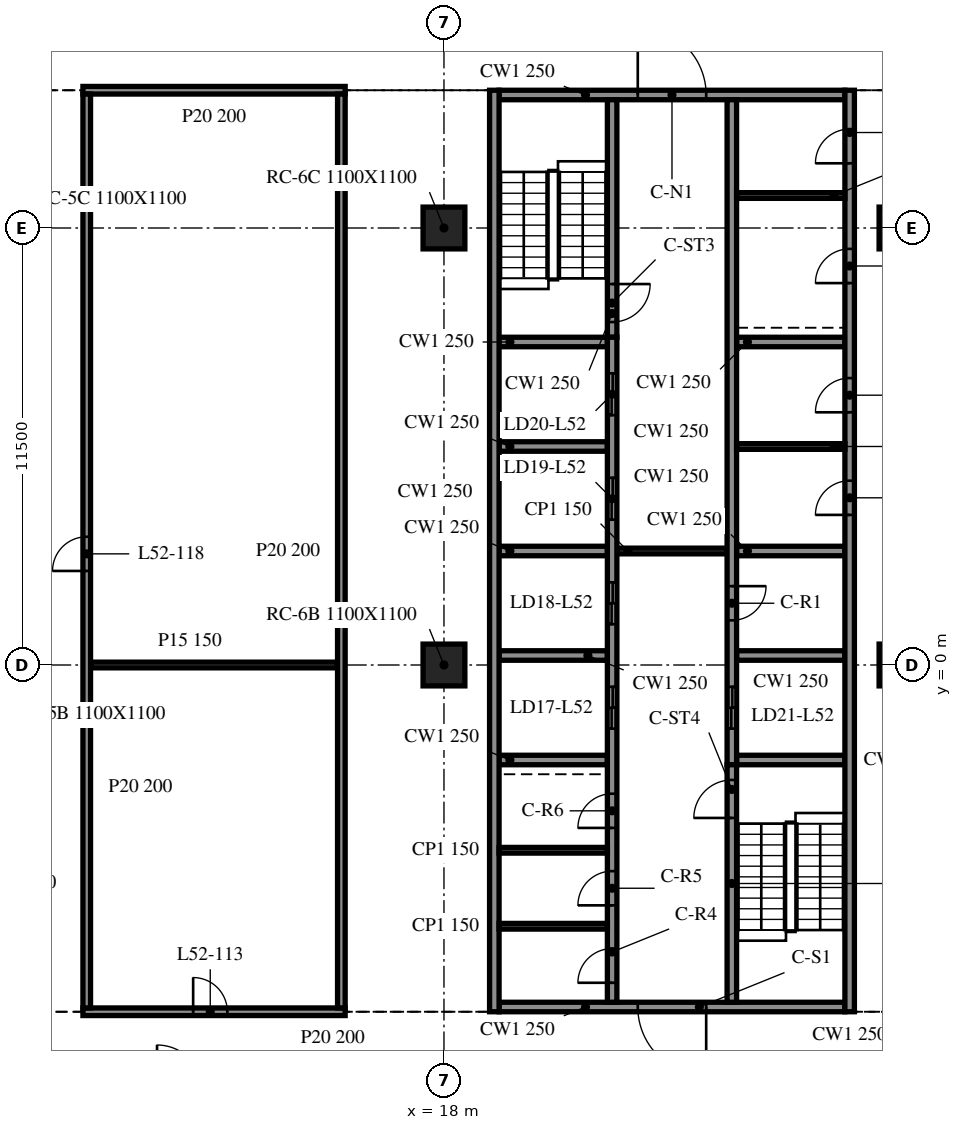
"""IFC4 building model, lengths in metres.
Left out: names, types, materials, properties, quantities, classifications, styles, units other than length and angle.
Written with IfcOpenShell. Run it as: python <this file> out.ifc"""

import sys

from ifc_helpers import new_model, si_unit, direction, frame, frame_2d, origin, origin_2d, place, context, subcontext, project, spatial, rectangle, extrude, element, fill, save


model = new_model("IFC4")
c1 = context("Model", 3, precision=1e-05, world=origin(), true_north=direction((0.0, 1.0)))
c2 = subcontext(c1, "Body", "Model", "MODEL_VIEW")
j1 = project(units=[si_unit("LENGTHUNIT", "METRE"), si_unit("PLANEANGLEUNIT", "RADIAN")], contexts=[c1])
p1 = place(None, origin())
s1 = spatial("IfcSite", under=j1, at=p1, CompositionType="ELEMENT")
p2 = place(p1, origin())
s2 = spatial("IfcBuilding", under=s1, at=p2, CompositionType="ELEMENT")
p3 = place(p2, frame((0.0, 0.0, 216.7)))
s3 = spatial("IfcBuildingStorey", under=s2, at=p3, CompositionType="ELEMENT", Elevation=216.7)
for number, where, z_axis, x_axis in (
    (1, (18.0, 0.0, -0.34), (0.0, 0.0, 1.0), (1.0, 0.0, 0.0)),
    (2, (18.0, 11.5, -0.34), (0.0, 0.0, 1.0), (1.0, 0.0, 0.0)),
    (3, (30.0, 0.0, -0.34), (0.0, 0.0, 1.0), (1.0, 0.0, 0.0)),
    (4, (30.0, 11.5, -0.34), (0.0, 0.0, 1.0), (1.0, 0.0, 0.0)),
):
    element("IfcColumn", number, at=place(p3, frame(where, z_axis=z_axis, x_axis=x_axis)), inside=s3, PredefinedType="COLUMN", context=c2, shape_type="SweptSolid", body=[
        extrude(rectangle(XDim=1.1, YDim=1.1, at=origin_2d()), origin(), (0.0, 0.0, 1.0), 3.8),
    ])
p4 = place(p3, frame((19.325, 15.125, 0.0), z_axis=(0.0, 0.0, 1.0), x_axis=(0.0, -1.0, 0.0)))
e5 = element("IfcWall", 5, at=p4, inside=s3, PredefinedType="SOLIDWALL", context=c2, shape_type="SweptSolid", body=[
    extrude(rectangle(XDim=24.25, YDim=0.25, at=frame_2d((12.125, 0.0))), origin(), (0.0, 0.0, 1.0), 3.46),
])
p5 = place(p3, frame((28.675, -9.125, 0.0), z_axis=(0.0, 0.0, 1.0), x_axis=(0.0, 1.0, 0.0)))
e6 = element("IfcWall", 6, at=p5, inside=s3, PredefinedType="SOLIDWALL", context=c2, shape_type="SweptSolid", body=[
    extrude(rectangle(XDim=24.25, YDim=0.25, at=frame_2d((12.125, 0.0))), origin(), (0.0, 0.0, 1.0), 3.46),
])
p6 = place(p5, frame((13.075, 0.0, 0.0)))
e7 = element("IfcOpeningElement", 7, at=p6, cuts=e6, PredefinedType="OPENING", context=c2, shape_type="SweptSolid", body=[
    extrude(rectangle(XDim=0.9, YDim=2.1, at=frame_2d((0.45, 1.05))), frame((0.0, 0.135, 0.0), z_axis=(0.0, -1.0, 0.0), x_axis=(1.0, 0.0, 0.0)), (0.0, 0.0, 1.0), 0.27),
])
p7 = place(p5, frame((15.775, 0.0, 0.0)))
e8 = element("IfcOpeningElement", 8, at=p7, cuts=e6, PredefinedType="OPENING", context=c2, shape_type="SweptSolid", body=[
    extrude(rectangle(XDim=0.9, YDim=2.1, at=frame_2d((0.45, 1.05))), frame((0.0, 0.135, 0.0), z_axis=(0.0, -1.0, 0.0), x_axis=(1.0, 0.0, 0.0)), (0.0, 0.0, 1.0), 0.27),
])
p8 = place(p5, frame((19.175, 0.0, 0.0)))
e9 = element("IfcOpeningElement", 9, at=p8, cuts=e6, PredefinedType="OPENING", context=c2, shape_type="SweptSolid", body=[
    extrude(rectangle(XDim=0.9, YDim=2.1, at=frame_2d((0.45, 1.05))), frame((0.0, 0.135, 0.0), z_axis=(0.0, -1.0, 0.0), x_axis=(1.0, 0.0, 0.0)), (0.0, 0.0, 1.0), 0.27),
])
p9 = place(p5, frame((22.327, 0.0, 0.0)))
e10 = element("IfcOpeningElement", 10, at=p9, cuts=e6, PredefinedType="OPENING", context=c2, shape_type="SweptSolid", body=[
    extrude(rectangle(XDim=0.9, YDim=2.1, at=frame_2d((0.45, 1.05))), frame((0.0, 0.135, 0.0), z_axis=(0.0, -1.0, 0.0), x_axis=(1.0, 0.0, 0.0)), (0.0, 0.0, 1.0), 0.27),
])
p10 = place(p3, frame((28.55, -9.0, 0.0), z_axis=(0.0, 0.0, 1.0), x_axis=(-1.0, 0.0, 0.0)))
e11 = element("IfcWall", 11, at=p10, inside=s3, PredefinedType="SOLIDWALL", context=c2, shape_type="SweptSolid", body=[
    extrude(rectangle(XDim=9.1, YDim=0.25, at=frame_2d((4.55, 0.0))), origin(), (0.0, 0.0, 1.0), 3.46),
])
p11 = place(p10, frame((3.65, 0.0, 0.0)))
e12 = element("IfcOpeningElement", 12, at=p11, cuts=e11, PredefinedType="OPENING", context=c2, shape_type="SweptSolid", body=[
    extrude(rectangle(XDim=1.8, YDim=2.1, at=frame_2d((0.9, 1.05))), frame((0.0, 0.135, 0.0), z_axis=(0.0, -1.0, 0.0), x_axis=(1.0, 0.0, 0.0)), (0.0, 0.0, 1.0), 0.27),
])
p12 = place(p3, frame((19.45, 15.0, 0.0), z_axis=(0.0, 0.0, 1.0), x_axis=(1.0, 0.0, 0.0)))
e13 = element("IfcWall", 13, at=p12, inside=s3, PredefinedType="SOLIDWALL", context=c2, shape_type="SweptSolid", body=[
    extrude(rectangle(XDim=9.1, YDim=0.25, at=frame_2d((4.55, 0.0))), origin(), (0.0, 0.0, 1.0), 3.46),
])
p13 = place(p12, frame((3.65, 0.0, 0.0)))
e14 = element("IfcOpeningElement", 14, at=p13, cuts=e13, PredefinedType="OPENING", context=c2, shape_type="SweptSolid", body=[
    extrude(rectangle(XDim=1.8, YDim=2.1, at=frame_2d((0.9, 1.05))), frame((0.0, 0.135, 0.0), z_axis=(0.0, -1.0, 0.0), x_axis=(1.0, 0.0, 0.0)), (0.0, 0.0, 1.0), 0.27),
])
p14 = place(p3, frame((22.425, -8.875, 0.0), z_axis=(0.0, 0.0, 1.0), x_axis=(0.0, 1.0, 0.0)))
e15 = element("IfcWall", 15, at=p14, inside=s3, PredefinedType="SOLIDWALL", context=c2, shape_type="SweptSolid", body=[
    extrude(rectangle(XDim=17.5, YDim=0.25, at=frame_2d((8.75, 0.0))), origin(), (0.0, 0.0, 1.0), 3.46),
])
p15 = place(p14, frame((7.2, 0.0, 0.0)))
e16 = element("IfcOpeningElement", 16, at=p15, cuts=e15, PredefinedType="OPENING", context=c2, shape_type="SweptSolid", body=[
    extrude(rectangle(XDim=1.1, YDim=2.1, at=frame_2d((0.55, 1.05))), frame((0.0, 0.135, 0.0), z_axis=(0.0, -1.0, 0.0), x_axis=(1.0, 0.0, 0.0)), (0.0, 0.0, 1.0), 0.27),
])
p16 = place(p14, frame((9.95, 0.0, 0.0)))
e17 = element("IfcOpeningElement", 17, at=p16, cuts=e15, PredefinedType="OPENING", context=c2, shape_type="SweptSolid", body=[
    extrude(rectangle(XDim=1.1, YDim=2.1, at=frame_2d((0.55, 1.05))), frame((0.0, 0.135, 0.0), z_axis=(0.0, -1.0, 0.0), x_axis=(1.0, 0.0, 0.0)), (0.0, 0.0, 1.0), 0.27),
])
p17 = place(p14, frame((12.7, 0.0, 0.0)))
e18 = element("IfcOpeningElement", 18, at=p17, cuts=e15, PredefinedType="OPENING", context=c2, shape_type="SweptSolid", body=[
    extrude(rectangle(XDim=1.1, YDim=2.1, at=frame_2d((0.55, 1.05))), frame((0.0, 0.135, 0.0), z_axis=(0.0, -1.0, 0.0), x_axis=(1.0, 0.0, 0.0)), (0.0, 0.0, 1.0), 0.27),
])
p18 = place(p14, frame((15.45, 0.0, 0.0)))
e19 = element("IfcOpeningElement", 19, at=p18, cuts=e15, PredefinedType="OPENING", context=c2, shape_type="SweptSolid", body=[
    extrude(rectangle(XDim=1.1, YDim=2.1, at=frame_2d((0.55, 1.05))), frame((0.0, 0.135, 0.0), z_axis=(0.0, -1.0, 0.0), x_axis=(1.0, 0.0, 0.0)), (0.0, 0.0, 1.0), 0.27),
])
p19 = place(p14, frame((0.512, 0.0, 0.0)))
e20 = element("IfcOpeningElement", 20, at=p19, cuts=e15, PredefinedType="OPENING", context=c2, shape_type="SweptSolid", body=[
    extrude(rectangle(XDim=0.9, YDim=2.1, at=frame_2d((0.45, 1.05))), frame((0.0, 0.135, 0.0), z_axis=(0.0, -1.0, 0.0), x_axis=(1.0, 0.0, 0.0)), (0.0, 0.0, 1.0), 0.27),
])
p20 = place(p14, frame((2.55, 0.0, 0.0)))
e21 = element("IfcOpeningElement", 21, at=p20, cuts=e15, PredefinedType="OPENING", context=c2, shape_type="SweptSolid", body=[
    extrude(rectangle(XDim=0.9, YDim=2.1, at=frame_2d((0.45, 1.05))), frame((0.0, 0.135, 0.0), z_axis=(0.0, -1.0, 0.0), x_axis=(1.0, 0.0, 0.0)), (0.0, 0.0, 1.0), 0.27),
])
p21 = place(p14, frame((4.587, 0.0, 0.0)))
e22 = element("IfcOpeningElement", 22, at=p21, cuts=e15, PredefinedType="OPENING", context=c2, shape_type="SweptSolid", body=[
    extrude(rectangle(XDim=0.9, YDim=2.1, at=frame_2d((0.45, 1.05))), frame((0.0, 0.135, 0.0), z_axis=(0.0, -1.0, 0.0), x_axis=(1.0, 0.0, 0.0)), (0.0, 0.0, 1.0), 0.27),
])
p22 = place(p3, frame((22.425, 14.875, 0.0), z_axis=(0.0, 0.0, 1.0), x_axis=(0.0, -1.0, 0.0)))
e23 = element("IfcWall", 23, at=p22, inside=s3, PredefinedType="SOLIDWALL", context=c2, shape_type="SweptSolid", body=[
    extrude(rectangle(XDim=6.25, YDim=0.25, at=frame_2d((3.125, 0.0))), origin(), (0.0, 0.0, 1.0), 3.46),
])
p23 = place(p22, frame((4.85, 0.0, 0.0)))
e24 = element("IfcOpeningElement", 24, at=p23, cuts=e23, PredefinedType="OPENING", context=c2, shape_type="SweptSolid", body=[
    extrude(rectangle(XDim=1.0, YDim=2.1, at=frame_2d((0.5, 1.05))), frame((0.0, 0.135, 0.0), z_axis=(0.0, -1.0, 0.0), x_axis=(1.0, 0.0, 0.0)), (0.0, 0.0, 1.0), 0.27),
])
p24 = place(p3, frame((25.575, -8.875, 0.0), z_axis=(0.0, 0.0, 1.0), x_axis=(0.0, 1.0, 0.0)))
e25 = element("IfcWall", 25, at=p24, inside=s3, PredefinedType="SOLIDWALL", context=c2, shape_type="SweptSolid", body=[
    extrude(rectangle(XDim=6.25, YDim=0.25, at=frame_2d((3.125, 0.0))), origin(), (0.0, 0.0, 1.0), 3.46),
])
p25 = place(p24, frame((4.85, 0.0, 0.0)))
e26 = element("IfcOpeningElement", 26, at=p25, cuts=e25, PredefinedType="OPENING", context=c2, shape_type="SweptSolid", body=[
    extrude(rectangle(XDim=1.0, YDim=2.1, at=frame_2d((0.5, 1.05))), frame((0.0, 0.135, 0.0), z_axis=(0.0, -1.0, 0.0), x_axis=(1.0, 0.0, 0.0)), (0.0, 0.0, 1.0), 0.27),
])
p26 = place(p3, frame((25.575, 14.875, 0.0), z_axis=(0.0, 0.0, 1.0), x_axis=(0.0, -1.0, 0.0)))
e27 = element("IfcWall", 27, at=p26, inside=s3, PredefinedType="SOLIDWALL", context=c2, shape_type="SweptSolid", body=[
    extrude(rectangle(XDim=17.5, YDim=0.25, at=frame_2d((8.75, 0.0))), origin(), (0.0, 0.0, 1.0), 3.46),
])
p27 = place(p26, frame((15.45, 0.0, 0.0)))
e28 = element("IfcOpeningElement", 28, at=p27, cuts=e27, PredefinedType="OPENING", context=c2, shape_type="SweptSolid", body=[
    extrude(rectangle(XDim=1.1, YDim=2.1, at=frame_2d((0.55, 1.05))), frame((0.0, 0.135, 0.0), z_axis=(0.0, -1.0, 0.0), x_axis=(1.0, 0.0, 0.0)), (0.0, 0.0, 1.0), 0.27),
])
p28 = place(p26, frame((12.8, 0.0, 0.0)))
e29 = element("IfcOpeningElement", 29, at=p28, cuts=e27, PredefinedType="OPENING", context=c2, shape_type="SweptSolid", body=[
    extrude(rectangle(XDim=0.9, YDim=2.1, at=frame_2d((0.45, 1.05))), frame((0.0, 0.135, 0.0), z_axis=(0.0, -1.0, 0.0), x_axis=(1.0, 0.0, 0.0)), (0.0, 0.0, 1.0), 0.27),
])
for number, where, z_axis, x_axis in (
    (30, (19.45, -2.5, 0.0), (0.0, 0.0, 1.0), (1.0, 0.0, 0.0)),
    (31, (19.45, 0.25, 0.0), (0.0, 0.0, 1.0), (1.0, 0.0, 0.0)),
    (32, (19.45, 3.0, 0.0), (0.0, 0.0, 1.0), (1.0, 0.0, 0.0)),
    (33, (19.45, 5.75, 0.0), (0.0, 0.0, 1.0), (1.0, 0.0, 0.0)),
    (34, (19.45, 8.5, 0.0), (0.0, 0.0, 1.0), (1.0, 0.0, 0.0)),
    (35, (25.7, -2.5, 0.0), (0.0, 0.0, 1.0), (1.0, 0.0, 0.0)),
    (36, (25.7, 0.25, 0.0), (0.0, 0.0, 1.0), (1.0, 0.0, 0.0)),
    (37, (25.7, 3.0, 0.0), (0.0, 0.0, 1.0), (1.0, 0.0, 0.0)),
    (38, (25.7, 8.5, 0.0), (0.0, 0.0, 1.0), (1.0, 0.0, 0.0)),
):
    element("IfcWall", number, at=place(p3, frame(where, z_axis=z_axis, x_axis=x_axis)), inside=s3, PredefinedType="SOLIDWALL", context=c2, shape_type="SweptSolid", body=[
        extrude(rectangle(XDim=2.85, YDim=0.25, at=frame_2d((1.425, 0.0))), origin(), (0.0, 0.0, 1.0), 3.46),
    ])
p29 = place(p3, frame((22.55, 3.0, 0.0), z_axis=(0.0, 0.0, 1.0), x_axis=(1.0, 0.0, 0.0)))
e39 = element("IfcWall", 39, at=p29, inside=s3, PredefinedType="PARTITIONING", context=c2, shape_type="SweptSolid", body=[
    extrude(rectangle(XDim=2.9, YDim=0.15, at=frame_2d((1.45, 0.0))), origin(), (0.0, 0.0, 1.0), 3.46),
])
for number, where, z_axis, x_axis in (
    (40, (25.7, 5.75, 0.0), (0.0, 0.0, 1.0), (1.0, 0.0, 0.0)),
    (41, (19.45, -6.875, 0.0), (0.0, 0.0, 1.0), (1.0, 0.0, 0.0)),
    (42, (19.45, -4.875, 0.0), (0.0, 0.0, 1.0), (1.0, 0.0, 0.0)),
    (43, (25.7, 12.355, 0.0), (0.0, 0.0, 1.0), (1.0, 0.0, 0.0)),
):
    element("IfcWall", number, at=place(p3, frame(where, z_axis=z_axis, x_axis=x_axis)), inside=s3, PredefinedType="PARTITIONING", context=c2, shape_type="SweptSolid", body=[
        extrude(rectangle(XDim=2.85, YDim=0.15, at=frame_2d((1.425, 0.0))), origin(), (0.0, 0.0, 1.0), 3.46),
    ])
p30 = place(p3, frame((8.5, -9.125, 0.0), z_axis=(0.0, 0.0, 1.0), x_axis=(1.0, 0.0, 0.0)))
e44 = element("IfcWall", 44, at=p30, inside=s3, PredefinedType="PARTITIONING", context=c2, shape_type="SweptSolid", body=[
    extrude(rectangle(XDim=6.9, YDim=0.2, at=frame_2d((3.45, 0.0))), origin(), (0.0, 0.0, 1.0), 3.46),
])
p31 = place(p30, frame((2.9, 0.0, 0.0)))
e45 = element("IfcOpeningElement", 45, at=p31, cuts=e44, PredefinedType="OPENING", context=c2, shape_type="SweptSolid", body=[
    extrude(rectangle(XDim=0.9, YDim=2.1, at=frame_2d((0.45, 1.05))), frame((0.0, 0.11, 0.0), z_axis=(0.0, -1.0, 0.0), x_axis=(1.0, 0.0, 0.0)), (0.0, 0.0, 1.0), 0.22),
])
p32 = place(p3, frame((8.7, 0.0, 0.0), z_axis=(0.0, 0.0, 1.0), x_axis=(1.0, 0.0, 0.0)))
e46 = element("IfcWall", 46, at=p32, inside=s3, PredefinedType="PARTITIONING", context=c2, shape_type="SweptSolid", body=[
    extrude(rectangle(XDim=6.5, YDim=0.15, at=frame_2d((3.25, 0.0))), origin(), (0.0, 0.0, 1.0), 3.46),
])
p33 = place(p3, frame((8.5, 15.125, 0.0), z_axis=(0.0, 0.0, 1.0), x_axis=(1.0, 0.0, 0.0)))
e47 = element("IfcWall", 47, at=p33, inside=s3, PredefinedType="PARTITIONING", context=c2, shape_type="SweptSolid", body=[
    extrude(rectangle(XDim=6.9, YDim=0.2, at=frame_2d((3.45, 0.0))), origin(), (0.0, 0.0, 1.0), 3.46),
])
p34 = place(p3, frame((8.6, -9.025, 0.0), z_axis=(0.0, 0.0, 1.0), x_axis=(0.0, 1.0, 0.0)))
e48 = element("IfcWall", 48, at=p34, inside=s3, PredefinedType="PARTITIONING", context=c2, shape_type="SweptSolid", body=[
    extrude(rectangle(XDim=24.05, YDim=0.2, at=frame_2d((12.025, 0.0))), origin(), (0.0, 0.0, 1.0), 3.46),
])
p35 = place(p34, frame((11.5, 0.0, 0.0)))
e49 = element("IfcOpeningElement", 49, at=p35, cuts=e48, PredefinedType="OPENING", context=c2, shape_type="SweptSolid", body=[
    extrude(rectangle(XDim=0.9, YDim=2.1, at=frame_2d((0.45, 1.05))), frame((0.0, 0.11, 0.0), z_axis=(0.0, -1.0, 0.0), x_axis=(1.0, 0.0, 0.0)), (0.0, 0.0, 1.0), 0.22),
])
p36 = place(p3, frame((15.3, -9.025, 0.0), z_axis=(0.0, 0.0, 1.0), x_axis=(0.0, 1.0, 0.0)))
e50 = element("IfcWall", 50, at=p36, inside=s3, PredefinedType="PARTITIONING", context=c2, shape_type="SweptSolid", body=[
    extrude(rectangle(XDim=24.05, YDim=0.2, at=frame_2d((12.025, 0.0))), origin(), (0.0, 0.0, 1.0), 3.46),
])
p37 = place(p11, origin())
e51 = element("IfcDoor", 51, at=p37, inside=s3, OperationType="DOUBLE_DOOR_SINGLE_SWING", PredefinedType="DOOR", context=c2, shape_type="SweptSolid", body=[
    extrude(rectangle(XDim=1.8, YDim=2.1, at=frame_2d((0.9, 1.05))), frame((0.0, 0.025, 0.0), z_axis=(0.0, -1.0, 0.0), x_axis=(1.0, 0.0, 0.0)), (0.0, 0.0, 1.0), 0.05),
])
fill(e12, e51)
p38 = place(p13, origin())
e52 = element("IfcDoor", 52, at=p38, inside=s3, OperationType="DOUBLE_DOOR_SINGLE_SWING", PredefinedType="DOOR", context=c2, shape_type="SweptSolid", body=[
    extrude(rectangle(XDim=1.8, YDim=2.1, at=frame_2d((0.9, 1.05))), frame((0.0, 0.025, 0.0), z_axis=(0.0, -1.0, 0.0), x_axis=(1.0, 0.0, 0.0)), (0.0, 0.0, 1.0), 0.05),
])
fill(e14, e52)
p39 = place(p27, origin())
e53 = element("IfcDoor", 53, at=p39, inside=s3, OperationType="DOUBLE_DOOR_SLIDING", PredefinedType="DOOR", context=c2, shape_type="SweptSolid", body=[
    extrude(rectangle(XDim=1.1, YDim=2.1, at=frame_2d((0.55, 1.05))), frame((0.0, 0.025, 0.0), z_axis=(0.0, -1.0, 0.0), x_axis=(1.0, 0.0, 0.0)), (0.0, 0.0, 1.0), 0.05),
])
fill(e28, e53)
p40 = place(p15, origin())
e54 = element("IfcDoor", 54, at=p40, inside=s3, OperationType="DOUBLE_DOOR_SLIDING", PredefinedType="DOOR", context=c2, shape_type="SweptSolid", body=[
    extrude(rectangle(XDim=1.1, YDim=2.1, at=frame_2d((0.55, 1.05))), frame((0.0, 0.025, 0.0), z_axis=(0.0, -1.0, 0.0), x_axis=(1.0, 0.0, 0.0)), (0.0, 0.0, 1.0), 0.05),
])
fill(e16, e54)
p41 = place(p16, origin())
e55 = element("IfcDoor", 55, at=p41, inside=s3, OperationType="DOUBLE_DOOR_SLIDING", PredefinedType="DOOR", context=c2, shape_type="SweptSolid", body=[
    extrude(rectangle(XDim=1.1, YDim=2.1, at=frame_2d((0.55, 1.05))), frame((0.0, 0.025, 0.0), z_axis=(0.0, -1.0, 0.0), x_axis=(1.0, 0.0, 0.0)), (0.0, 0.0, 1.0), 0.05),
])
fill(e17, e55)
p42 = place(p17, origin())
e56 = element("IfcDoor", 56, at=p42, inside=s3, OperationType="DOUBLE_DOOR_SLIDING", PredefinedType="DOOR", context=c2, shape_type="SweptSolid", body=[
    extrude(rectangle(XDim=1.1, YDim=2.1, at=frame_2d((0.55, 1.05))), frame((0.0, 0.025, 0.0), z_axis=(0.0, -1.0, 0.0), x_axis=(1.0, 0.0, 0.0)), (0.0, 0.0, 1.0), 0.05),
])
fill(e18, e56)
p43 = place(p18, origin())
e57 = element("IfcDoor", 57, at=p43, inside=s3, OperationType="DOUBLE_DOOR_SLIDING", PredefinedType="DOOR", context=c2, shape_type="SweptSolid", body=[
    extrude(rectangle(XDim=1.1, YDim=2.1, at=frame_2d((0.55, 1.05))), frame((0.0, 0.025, 0.0), z_axis=(0.0, -1.0, 0.0), x_axis=(1.0, 0.0, 0.0)), (0.0, 0.0, 1.0), 0.05),
])
fill(e19, e57)
p44 = place(p28, origin())
e58 = element("IfcDoor", 58, at=p44, inside=s3, OperationType="SINGLE_SWING_LEFT", PredefinedType="DOOR", context=c2, shape_type="SweptSolid", body=[
    extrude(rectangle(XDim=0.9, YDim=2.1, at=frame_2d((0.45, 1.05))), frame((0.0, 0.025, 0.0), z_axis=(0.0, -1.0, 0.0), x_axis=(1.0, 0.0, 0.0)), (0.0, 0.0, 1.0), 0.05),
])
fill(e29, e58)
p45 = place(p6, origin())
e59 = element("IfcDoor", 59, at=p45, inside=s3, OperationType="SINGLE_SWING_RIGHT", PredefinedType="DOOR", context=c2, shape_type="SweptSolid", body=[
    extrude(rectangle(XDim=0.9, YDim=2.1, at=frame_2d((0.45, 1.05))), frame((0.0, 0.025, 0.0), z_axis=(0.0, -1.0, 0.0), x_axis=(1.0, 0.0, 0.0)), (0.0, 0.0, 1.0), 0.05),
])
fill(e7, e59)
p46 = place(p7, origin())
e60 = element("IfcDoor", 60, at=p46, inside=s3, OperationType="SINGLE_SWING_LEFT", PredefinedType="DOOR", context=c2, shape_type="SweptSolid", body=[
    extrude(rectangle(XDim=0.9, YDim=2.1, at=frame_2d((0.45, 1.05))), frame((0.0, 0.025, 0.0), z_axis=(0.0, -1.0, 0.0), x_axis=(1.0, 0.0, 0.0)), (0.0, 0.0, 1.0), 0.05),
])
fill(e8, e60)
p47 = place(p19, origin())
e61 = element("IfcDoor", 61, at=p47, inside=s3, OperationType="SINGLE_SWING_RIGHT", PredefinedType="DOOR", context=c2, shape_type="SweptSolid", body=[
    extrude(rectangle(XDim=0.9, YDim=2.1, at=frame_2d((0.45, 1.05))), frame((0.0, 0.025, 0.0), z_axis=(0.0, -1.0, 0.0), x_axis=(1.0, 0.0, 0.0)), (0.0, 0.0, 1.0), 0.05),
])
fill(e20, e61)
p48 = place(p20, origin())
e62 = element("IfcDoor", 62, at=p48, inside=s3, OperationType="SINGLE_SWING_LEFT", PredefinedType="DOOR", context=c2, shape_type="SweptSolid", body=[
    extrude(rectangle(XDim=0.9, YDim=2.1, at=frame_2d((0.45, 1.05))), frame((0.0, 0.025, 0.0), z_axis=(0.0, -1.0, 0.0), x_axis=(1.0, 0.0, 0.0)), (0.0, 0.0, 1.0), 0.05),
])
fill(e21, e62)
p49 = place(p21, origin())
e63 = element("IfcDoor", 63, at=p49, inside=s3, OperationType="SINGLE_SWING_RIGHT", PredefinedType="DOOR", context=c2, shape_type="SweptSolid", body=[
    extrude(rectangle(XDim=0.9, YDim=2.1, at=frame_2d((0.45, 1.05))), frame((0.0, 0.025, 0.0), z_axis=(0.0, -1.0, 0.0), x_axis=(1.0, 0.0, 0.0)), (0.0, 0.0, 1.0), 0.05),
])
fill(e22, e63)
p50 = place(p8, origin())
e64 = element("IfcDoor", 64, at=p50, inside=s3, OperationType="SINGLE_SWING_LEFT", PredefinedType="DOOR", context=c2, shape_type="SweptSolid", body=[
    extrude(rectangle(XDim=0.9, YDim=2.1, at=frame_2d((0.45, 1.05))), frame((0.0, 0.025, 0.0), z_axis=(0.0, -1.0, 0.0), x_axis=(1.0, 0.0, 0.0)), (0.0, 0.0, 1.0), 0.05),
])
fill(e9, e64)
p51 = place(p9, origin())
e65 = element("IfcDoor", 65, at=p51, inside=s3, OperationType="SINGLE_SWING_RIGHT", PredefinedType="DOOR", context=c2, shape_type="SweptSolid", body=[
    extrude(rectangle(XDim=0.9, YDim=2.1, at=frame_2d((0.45, 1.05))), frame((0.0, 0.025, 0.0), z_axis=(0.0, -1.0, 0.0), x_axis=(1.0, 0.0, 0.0)), (0.0, 0.0, 1.0), 0.05),
])
fill(e10, e65)
p52 = place(p23, origin())
e66 = element("IfcDoor", 66, at=p52, inside=s3, OperationType="SINGLE_SWING_LEFT", PredefinedType="DOOR", context=c2, shape_type="SweptSolid", body=[
    extrude(rectangle(XDim=1.0, YDim=2.1, at=frame_2d((0.5, 1.05))), frame((0.0, 0.025, 0.0), z_axis=(0.0, -1.0, 0.0), x_axis=(1.0, 0.0, 0.0)), (0.0, 0.0, 1.0), 0.05),
])
fill(e24, e66)
p53 = place(p25, origin())
e67 = element("IfcDoor", 67, at=p53, inside=s3, OperationType="SINGLE_SWING_RIGHT", PredefinedType="DOOR", context=c2, shape_type="SweptSolid", body=[
    extrude(rectangle(XDim=1.0, YDim=2.1, at=frame_2d((0.5, 1.05))), frame((0.0, 0.025, 0.0), z_axis=(0.0, -1.0, 0.0), x_axis=(1.0, 0.0, 0.0)), (0.0, 0.0, 1.0), 0.05),
])
fill(e26, e67)
p54 = place(p31, origin())
e68 = element("IfcDoor", 68, at=p54, inside=s3, OperationType="SINGLE_SWING_LEFT", PredefinedType="DOOR", context=c2, shape_type="SweptSolid", body=[
    extrude(rectangle(XDim=0.9, YDim=2.1, at=frame_2d((0.45, 1.05))), frame((0.0, 0.025, 0.0), z_axis=(0.0, -1.0, 0.0), x_axis=(1.0, 0.0, 0.0)), (0.0, 0.0, 1.0), 0.05),
])
fill(e45, e68)
p55 = place(p35, origin())
e69 = element("IfcDoor", 69, at=p55, inside=s3, OperationType="SINGLE_SWING_RIGHT", PredefinedType="DOOR", context=c2, shape_type="SweptSolid", body=[
    extrude(rectangle(XDim=0.9, YDim=2.1, at=frame_2d((0.45, 1.05))), frame((0.0, 0.025, 0.0), z_axis=(0.0, -1.0, 0.0), x_axis=(1.0, 0.0, 0.0)), (0.0, 0.0, 1.0), 0.05),
])
fill(e49, e69)
save(model, sys.argv[1])
